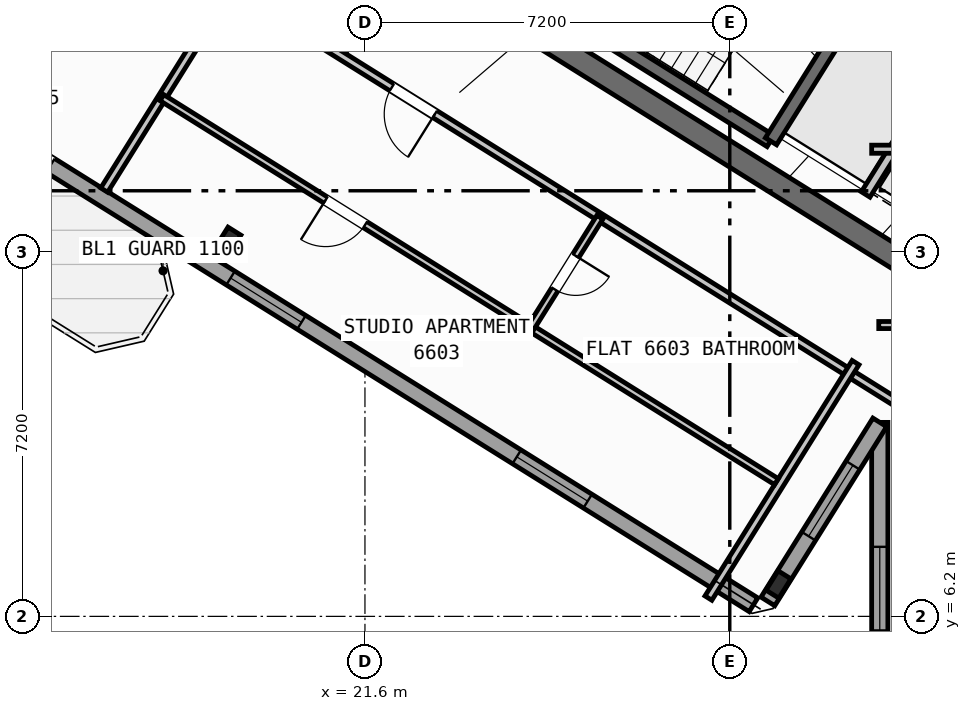
"""IFC4 building model, lengths in metres.
Left out: names, types, materials, properties, quantities, classifications, styles, units other than length and angle.
Written with IfcOpenShell. Run it as: python <this file> out.ifc"""

import sys

from ifc_helpers import new_model, si_unit, direction, frame, frame_2d, origin, origin_2d, place, context, subcontext, project, spatial, rectangle, i_section, extrude, source, transform, mapped, element, fill, save


model = new_model("IFC4")
c1 = context("Model", 3, precision=1e-05, world=origin(), true_north=direction((0.0, 1.0)))
c2 = subcontext(c1, "Body", "Model", "MODEL_VIEW")
j1 = project(units=[si_unit("LENGTHUNIT", "METRE"), si_unit("PLANEANGLEUNIT", "RADIAN")], contexts=[c1])
p1 = place(None, origin())
s1 = spatial("IfcSite", under=j1, at=p1, CompositionType="ELEMENT")
p2 = place(p1, origin())
s2 = spatial("IfcBuilding", under=s1, at=p2, CompositionType="ELEMENT")
p3 = place(p2, frame((0.0, 0.0, 262.8)))
s3 = spatial("IfcBuildingStorey", under=s2, at=p3, CompositionType="ELEMENT", Elevation=262.8)
p4 = place(p3, frame((33.324, 12.503, 0.0), z_axis=(0.0, 0.0, 1.0), x_axis=(-0.848043529849, 0.529926571782, 0.0)))
e1 = element("IfcWall", 1, at=p4, inside=s3, PredefinedType="SHEAR", context=c2, shape_type="SweptSolid", body=[
    extrude(rectangle(XDim=13.04, YDim=0.45, at=frame_2d((6.52, 0.0))), origin(), (0.0, 0.0, 1.0), 3.35),
])
m1 = source(origin(), c2, "Body", "SweptSolid", [
    extrude(i_section(OverallWidth=0.3, OverallDepth=0.45, WebThickness=0.014, FlangeThickness=0.026, at=origin_2d()), origin(), (0.0, 0.0, 1.0), 3.6),
])
for number, where, z_axis, x_axis in (
    (2, (29.761, 6.829, 0.0), (0.0, 0.0, 1.0), (-0.848, 0.53, 0.0)),
    (3, (18.906, 13.612, 0.0), (0.0, 0.0, 1.0), (-0.848, 0.53, 0.0)),
):
    element("IfcColumn", number, at=place(p3, frame(where, z_axis=z_axis, x_axis=x_axis)), inside=s3, PredefinedType="COLUMN", context=c2, shape_type="MappedRepresentation", body=[
        mapped(m1, transform((0.0, 0.0, 0.0), scale=1.0)),
    ])
p5 = place(p3, frame((31.76, 3.466, 0.0), z_axis=(0.0, 0.0, 1.0), x_axis=(0.0, 1.0, 0.0)))
e4 = element("IfcWall", 4, at=p5, inside=s3, PredefinedType="STANDARD", context=c2, shape_type="SweptSolid", body=[
    extrude(rectangle(XDim=6.562, YDim=0.32, at=frame_2d((3.281, 0.0))), origin(), (0.0, 0.0, 1.0), 3.35),
])
p6 = place(p5, frame((2.456, 0.0, 0.9)))
e5 = element("IfcOpeningElement", 5, at=p6, cuts=e4, PredefinedType="OPENING", context=c2, shape_type="SweptSolid", body=[
    extrude(rectangle(XDim=1.65, YDim=1.45, at=frame_2d((0.825, 0.725))), frame((0.0, 0.17, 0.0), z_axis=(0.0, -1.0, 0.0), x_axis=(1.0, 0.0, 0.0)), (0.0, 0.0, 1.0), 0.34),
])
p7 = place(p3, frame((31.76, 10.029, 0.0), z_axis=(0.0, 0.0, 1.0), x_axis=(-0.529930468064, -0.848041095123, 0.0)))
e6 = element("IfcWall", 6, at=p7, inside=s3, PredefinedType="STANDARD", context=c2, shape_type="SweptSolid", body=[
    extrude(rectangle(XDim=4.167, YDim=0.32, at=frame_2d((2.083, 0.0))), origin(), (0.0, 0.0, 1.0), 2.875),
])
p8 = place(p7, frame((0.999, 0.0, 0.9)))
e7 = element("IfcOpeningElement", 7, at=p8, cuts=e6, PredefinedType="OPENING", context=c2, shape_type="SweptSolid", body=[
    extrude(rectangle(XDim=1.65, YDim=1.45, at=frame_2d((0.825, 0.725))), frame((0.0, 0.17, 0.0), z_axis=(0.0, -1.0, 0.0), x_axis=(1.0, 0.0, 0.0)), (0.0, 0.0, 1.0), 0.34),
])
p9 = place(p3, frame((29.268, 6.429, 0.0), z_axis=(0.0, 0.0, 1.0), x_axis=(-0.848049971435, 0.529916263149, 0.0)))
e8 = element("IfcWall", 8, at=p9, inside=s3, PredefinedType="STANDARD", context=c2, shape_type="SweptSolid", body=[
    extrude(rectangle(XDim=31.588, YDim=0.32, at=frame_2d((15.794, 0.0))), origin(), (0.0, 0.0, 1.0), 3.35),
])
p10 = place(p9, frame((16.362, 0.0, 0.0)))
e9 = element("IfcOpeningElement", 9, at=p10, cuts=e8, PredefinedType="OPENING", context=c2, shape_type="SweptSolid", body=[
    extrude(rectangle(XDim=1.2, YDim=2.15, at=frame_2d((0.6, 1.075))), frame((0.0, 0.17, 0.0), z_axis=(0.0, -1.0, 0.0), x_axis=(1.0, 0.0, 0.0)), (0.0, 0.0, 1.0), 0.34),
])
p11 = place(p9, frame((3.859, 0.0, 0.9)))
e10 = element("IfcOpeningElement", 10, at=p11, cuts=e8, PredefinedType="OPENING", context=c2, shape_type="SweptSolid", body=[
    extrude(rectangle(XDim=1.65, YDim=1.45, at=frame_2d((0.825, 0.725))), frame((0.0, 0.17, 0.0), z_axis=(0.0, -1.0, 0.0), x_axis=(1.0, 0.0, 0.0)), (0.0, 0.0, 1.0), 0.34),
])
p12 = place(p9, frame((10.519, 0.0, 0.9)))
e11 = element("IfcOpeningElement", 11, at=p12, cuts=e8, PredefinedType="OPENING", context=c2, shape_type="SweptSolid", body=[
    extrude(rectangle(XDim=1.65, YDim=1.45, at=frame_2d((0.825, 0.725))), frame((0.0, 0.17, 0.0), z_axis=(0.0, -1.0, 0.0), x_axis=(1.0, 0.0, 0.0)), (0.0, 0.0, 1.0), 0.34),
])
p13 = place(p9, frame((20.015, 0.0, 0.95)))
e12 = element("IfcOpeningElement", 12, at=p13, cuts=e8, PredefinedType="OPENING", context=c2, shape_type="SweptSolid", body=[
    extrude(rectangle(XDim=1.95, YDim=1.35, at=frame_2d((0.975, 0.675))), frame((0.0, 0.17, 0.0), z_axis=(0.0, -1.0, 0.0), x_axis=(1.0, 0.0, 0.0)), (0.0, 0.0, 1.0), 0.34),
])
p14 = place(p9, frame((23.715, 0.0, 1.0)))
e13 = element("IfcOpeningElement", 13, at=p14, cuts=e8, PredefinedType="OPENING", context=c2, shape_type="SweptSolid", body=[
    extrude(rectangle(XDim=0.9, YDim=1.25, at=frame_2d((0.45, 0.625))), frame((0.0, 0.17, 0.0), z_axis=(0.0, -1.0, 0.0), x_axis=(1.0, 0.0, 0.0)), (0.0, 0.0, 1.0), 0.34),
])
p15 = place(p9, frame((26.391, 0.0, 0.9)))
e14 = element("IfcOpeningElement", 14, at=p15, cuts=e8, PredefinedType="OPENING", context=c2, shape_type="SweptSolid", body=[
    extrude(rectangle(XDim=1.65, YDim=1.45, at=frame_2d((0.825, 0.725))), frame((0.0, 0.17, 0.0), z_axis=(0.0, -1.0, 0.0), x_axis=(1.0, 0.0, 0.0)), (0.0, 0.0, 1.0), 0.34),
])
p16 = place(p9, frame((29.878, 0.0, 1.0)))
e15 = element("IfcOpeningElement", 15, at=p16, cuts=e8, PredefinedType="OPENING", context=c2, shape_type="SweptSolid", body=[
    extrude(rectangle(XDim=0.9, YDim=1.25, at=frame_2d((0.45, 0.625))), frame((0.0, 0.17, 0.0), z_axis=(0.0, -1.0, 0.0), x_axis=(1.0, 0.0, 0.0)), (0.0, 0.0, 1.0), 0.34),
])
p17 = place(p3, frame((29.605, 15.581, 0.0), z_axis=(0.0, 0.0, 1.0), x_axis=(-0.848036911448, 0.529937163087, 0.0)))
e16 = element("IfcWall", 16, at=p17, inside=s3, PredefinedType="SHEAR", context=c2, shape_type="SweptSolid", body=[
    extrude(rectangle(XDim=7.46, YDim=0.26, at=frame_2d((3.73, 0.0))), origin(), (0.0, 0.0, 1.0), 3.35),
])
p18 = place(p3, frame((31.288, 18.256, 0.0), z_axis=(0.0, 0.0, 1.0), x_axis=(-0.529943379326, -0.848033026897, 0.0)))
e17 = element("IfcWall", 17, at=p18, inside=s3, PredefinedType="SHEAR", context=c2, shape_type="SweptSolid", body=[
    extrude(rectangle(XDim=3.16, YDim=0.26, at=frame_2d((1.58, 0.0))), origin(), (0.0, 0.0, 1.0), 3.35),
])
p19 = place(p3, frame((34.933, 15.978, 0.0), z_axis=(0.0, 0.0, 1.0), x_axis=(-0.848055739377, 0.529907032327, 0.0)))
e18 = element("IfcWall", 18, at=p19, inside=s3, PredefinedType="STANDARD", context=c2, shape_type="SweptSolid", body=[
    extrude(rectangle(XDim=4.298, YDim=0.2, at=frame_2d((2.149, 0.0))), origin(), (0.0, 0.0, 1.0), 3.34),
])
p20 = place(p19, frame((0.448, 0.0, 0.0)))
e19 = element("IfcOpeningElement", 19, at=p20, cuts=e18, PredefinedType="OPENING", context=c2, shape_type="SweptSolid", body=[
    extrude(rectangle(XDim=1.3, YDim=2.2, at=frame_2d((0.65, 1.1))), frame((0.0, 0.11, 0.0), z_axis=(0.0, -1.0, 0.0), x_axis=(1.0, 0.0, 0.0)), (0.0, 0.0, 1.0), 0.22),
])
p21 = place(p19, frame((2.523, 0.0, 0.0)))
e20 = element("IfcOpeningElement", 20, at=p21, cuts=e18, PredefinedType="OPENING", context=c2, shape_type="SweptSolid", body=[
    extrude(rectangle(XDim=1.45, YDim=2.25, at=frame_2d((0.725, 1.125))), frame((0.0, 0.11, 0.0), z_axis=(0.0, -1.0, 0.0), x_axis=(1.0, 0.0, 0.0)), (0.0, 0.0, 1.0), 0.22),
])
p22 = place(p3, frame((33.029, 17.003, 0.0), z_axis=(0.0, 0.0, 1.0), x_axis=(-0.529916267533, -0.848049968695, 0.0)))
e21 = element("IfcWall", 21, at=p22, inside=s3, PredefinedType="STANDARD", context=c2, shape_type="SweptSolid", body=[
    extrude(rectangle(XDim=2.92, YDim=0.2, at=frame_2d((1.46, 0.0))), origin(), (0.0, 0.0, 1.0), 3.34),
])
p23 = place(p3, frame((21.206, 17.292, 0.0), z_axis=(0.0, 0.0, 1.0), x_axis=(-0.848050851465, 0.529914854792, 0.0)))
e22 = element("IfcWall", 22, at=p23, inside=s3, PredefinedType="PARTITIONING", context=c2, shape_type="SweptSolid", body=[
    extrude(rectangle(XDim=2.61, YDim=0.16, at=frame_2d((1.305, 0.0))), origin(), (0.0, 0.0, 1.0), 3.34),
])
p24 = place(p3, frame((25.198, 28.606, 0.0), z_axis=(0.0, 0.0, 1.0), x_axis=(-0.529921796515, -0.848046513806, 0.0)))
e23 = element("IfcWall", 23, at=p24, inside=s3, PredefinedType="PARTITIONING", context=c2, shape_type="SweptSolid", body=[
    extrude(rectangle(XDim=16.5, YDim=0.16, at=frame_2d((8.25, 0.0))), origin(), (0.0, 0.0, 1.0), 3.34),
])
p25 = place(p3, frame((16.572, 21.954, 0.0), z_axis=(0.0, 0.0, 1.0), x_axis=(-0.529904903214, -0.848057069748, 0.0)))
e24 = element("IfcWall", 24, at=p25, inside=s3, PredefinedType="PARTITIONING", context=c2, shape_type="SweptSolid", body=[
    extrude(rectangle(XDim=5.601, YDim=0.16, at=frame_2d((2.801, 0.0))), origin(), (0.0, 0.0, 1.0), 2.875),
])
p26 = place(p3, frame((32.164, 10.374, 0.0), z_axis=(0.0, 0.0, 1.0), x_axis=(-0.848044107957, 0.529925646633, 0.0)))
e25 = element("IfcWall", 25, at=p26, inside=s3, PredefinedType="PARTITIONING", context=c2, shape_type="SweptSolid", body=[
    extrude(rectangle(XDim=15.57, YDim=0.16, at=frame_2d((7.785, 0.0))), origin(), (0.0, 0.0, 1.0), 3.34),
])
p27 = place(p26, frame((10.83, 0.0, 0.0)))
e26 = element("IfcOpeningElement", 26, at=p27, cuts=e25, PredefinedType="OPENING", context=c2, shape_type="SweptSolid", body=[
    extrude(rectangle(XDim=1.0, YDim=2.1, at=frame_2d((0.5, 1.05))), frame((0.0, 0.09, 0.0), z_axis=(0.0, -1.0, 0.0), x_axis=(1.0, 0.0, 0.0)), (0.0, 0.0, 1.0), 0.18),
])
p28 = place(p3, frame((31.282, 11.208, 0.0), z_axis=(0.0, 0.0, 1.0), x_axis=(-0.529938869374, -0.84803584519, 0.0)))
e27 = element("IfcWall", 27, at=p28, inside=s3, PredefinedType="PARTITIONING", context=c2, shape_type="SweptSolid", body=[
    extrude(rectangle(XDim=5.48, YDim=0.16, at=frame_2d((2.74, 0.0))), origin(), (0.0, 0.0, 1.0), 3.34),
])
p29 = place(p3, frame((29.72, 8.859, 0.0), z_axis=(0.0, 0.0, 1.0), x_axis=(-0.848049134363, 0.529917602752, 0.0)))
e28 = element("IfcWall", 28, at=p29, inside=s3, PredefinedType="PLUMBINGWALL", context=c2, shape_type="SweptSolid", body=[
    extrude(rectangle(XDim=14.3, YDim=0.14, at=frame_2d((7.15, 0.0))), origin(), (0.0, 0.0, 1.0), 3.34),
])
p30 = place(p29, frame((9.57, 0.0, 0.0)))
e29 = element("IfcOpeningElement", 29, at=p30, cuts=e28, PredefinedType="OPENING", context=c2, shape_type="SweptSolid", body=[
    extrude(rectangle(XDim=0.92, YDim=2.08, at=frame_2d((0.46, 1.04))), frame((0.0, 0.08, 0.0), z_axis=(0.0, -1.0, 0.0), x_axis=(1.0, 0.0, 0.0)), (0.0, 0.0, 1.0), 0.16),
])
p31 = place(p3, frame((26.237, 14.078, 0.0), z_axis=(0.0, 0.0, 1.0), x_axis=(-0.52995640672, -0.848024885824, 0.0)))
e30 = element("IfcWall", 30, at=p31, inside=s3, PredefinedType="PLUMBINGWALL", context=c2, shape_type="SweptSolid", body=[
    extrude(rectangle(XDim=2.58, YDim=0.14, at=frame_2d((1.29, 0.0))), origin(), (0.0, 0.0, 1.0), 3.34),
])
p32 = place(p31, frame((0.9, 0.0, 0.0)))
e31 = element("IfcOpeningElement", 31, at=p32, cuts=e30, PredefinedType="OPENING", context=c2, shape_type="SweptSolid", body=[
    extrude(rectangle(XDim=0.78, YDim=2.05, at=frame_2d((0.39, 1.025))), frame((0.0, 0.08, 0.0), z_axis=(0.0, -1.0, 0.0), x_axis=(1.0, 0.0, 0.0)), (0.0, 0.0, 1.0), 0.16),
])
p33 = place(p3, frame((31.6, 15.42, 0.0), z_axis=(0.0, 0.0, 1.0), x_axis=(1.0, 0.0, 0.0)))
e32 = element("IfcWall", 32, at=p33, inside=s3, PredefinedType="PARTITIONING", context=c2, shape_type="SweptSolid", body=[
    extrude(rectangle(XDim=2.984, YDim=0.16, at=frame_2d((1.492, 0.0))), origin(), (0.0, 0.0, 1.0), 3.34),
])
p34 = place(p3, frame((31.74, 11.95, 0.0), z_axis=(0.0, 0.0, 1.0), x_axis=(1.0, 0.0, 0.0)))
e33 = element("IfcWall", 33, at=p34, inside=s3, PredefinedType="PLUMBINGWALL", context=c2, shape_type="SweptSolid", body=[
    extrude(rectangle(XDim=0.842, YDim=0.14, at=frame_2d((0.421, 0.0))), origin(), (0.0, 0.0, 1.0), 3.34),
])
m2 = source(origin(), c2, "Body", "SweptSolid", [
    extrude(rectangle(XDim=1.65, YDim=1.45, at=frame_2d((0.825, 0.725))), frame((0.0, 0.03, 0.0), z_axis=(0.0, -1.0, 0.0), x_axis=(1.0, 0.0, 0.0)), (0.0, 0.0, 1.0), 0.06),
])
p35 = place(p6, origin())
e34 = element("IfcWindow", 34, at=p35, inside=s3, PartitioningType="SINGLE_PANEL", PredefinedType="WINDOW", context=c2, shape_type="MappedRepresentation", body=[
    mapped(m2, transform((0.0, 0.0, 0.0), scale=1.0)),
])
fill(e5, e34)
p36 = place(p8, origin())
e35 = element("IfcWindow", 35, at=p36, inside=s3, PartitioningType="SINGLE_PANEL", PredefinedType="WINDOW", context=c2, shape_type="MappedRepresentation", body=[
    mapped(m2, transform((0.0, 0.0, 0.0), scale=1.0)),
])
fill(e7, e35)
p37 = place(p11, origin())
e36 = element("IfcWindow", 36, at=p37, inside=s3, PartitioningType="SINGLE_PANEL", PredefinedType="WINDOW", context=c2, shape_type="MappedRepresentation", body=[
    mapped(m2, transform((0.0, 0.0, 0.0), scale=1.0)),
])
fill(e10, e36)
p38 = place(p12, origin())
e37 = element("IfcWindow", 37, at=p38, inside=s3, PartitioningType="SINGLE_PANEL", PredefinedType="WINDOW", context=c2, shape_type="MappedRepresentation", body=[
    mapped(m2, transform((0.0, 0.0, 0.0), scale=1.0)),
])
fill(e11, e37)
m3 = source(origin(), c2, "Body", "SweptSolid", [
    extrude(rectangle(XDim=1.45, YDim=2.25, at=frame_2d((0.725, 1.125))), frame((0.0, 0.025, 0.0), z_axis=(0.0, -1.0, 0.0), x_axis=(1.0, 0.0, 0.0)), (0.0, 0.0, 1.0), 0.05),
])
p39 = place(p21, origin())
e38 = element("IfcDoor", 38, at=p39, inside=s3, OperationType="DOUBLE_DOOR_SLIDING", PredefinedType="DOOR", context=c2, shape_type="MappedRepresentation", body=[
    mapped(m3, transform((0.0, 0.0, 0.0), scale=1.0)),
])
fill(e20, e38)
m4 = source(origin(), c2, "Body", "SweptSolid", [
    extrude(rectangle(XDim=1.0, YDim=2.1, at=frame_2d((0.5, 1.05))), frame((0.0, 0.025, 0.0), z_axis=(0.0, -1.0, 0.0), x_axis=(1.0, 0.0, 0.0)), (0.0, 0.0, 1.0), 0.05),
])
p40 = place(p27, origin())
e39 = element("IfcDoor", 39, at=p40, inside=s3, OperationType="SINGLE_SWING_LEFT", PredefinedType="DOOR", context=c2, shape_type="MappedRepresentation", body=[
    mapped(m4, transform((0.0, 0.0, 0.0), scale=1.0)),
])
fill(e26, e39)
m5 = source(origin(), c2, "Body", "SweptSolid", [
    extrude(rectangle(XDim=0.92, YDim=2.08, at=frame_2d((0.46, 1.04))), frame((0.0, 0.025, 0.0), z_axis=(0.0, -1.0, 0.0), x_axis=(1.0, 0.0, 0.0)), (0.0, 0.0, 1.0), 0.05),
])
p41 = place(p30, origin())
e40 = element("IfcDoor", 40, at=p41, inside=s3, OperationType="SINGLE_SWING_RIGHT", PredefinedType="DOOR", context=c2, shape_type="MappedRepresentation", body=[
    mapped(m5, transform((0.0, 0.0, 0.0), scale=1.0)),
])
fill(e29, e40)
m6 = source(origin(), c2, "Body", "SweptSolid", [
    extrude(rectangle(XDim=0.78, YDim=2.05, at=frame_2d((0.39, 1.025))), frame((0.0, 0.025, 0.0), z_axis=(0.0, -1.0, 0.0), x_axis=(1.0, 0.0, 0.0)), (0.0, 0.0, 1.0), 0.05),
])
p42 = place(p32, origin())
e41 = element("IfcDoor", 41, at=p42, inside=s3, OperationType="SINGLE_SWING_LEFT", PredefinedType="DOOR", context=c2, shape_type="MappedRepresentation", body=[
    mapped(m6, transform((0.0, 0.0, 0.0), scale=1.0)),
])
fill(e31, e41)
save(model, sys.argv[1])
